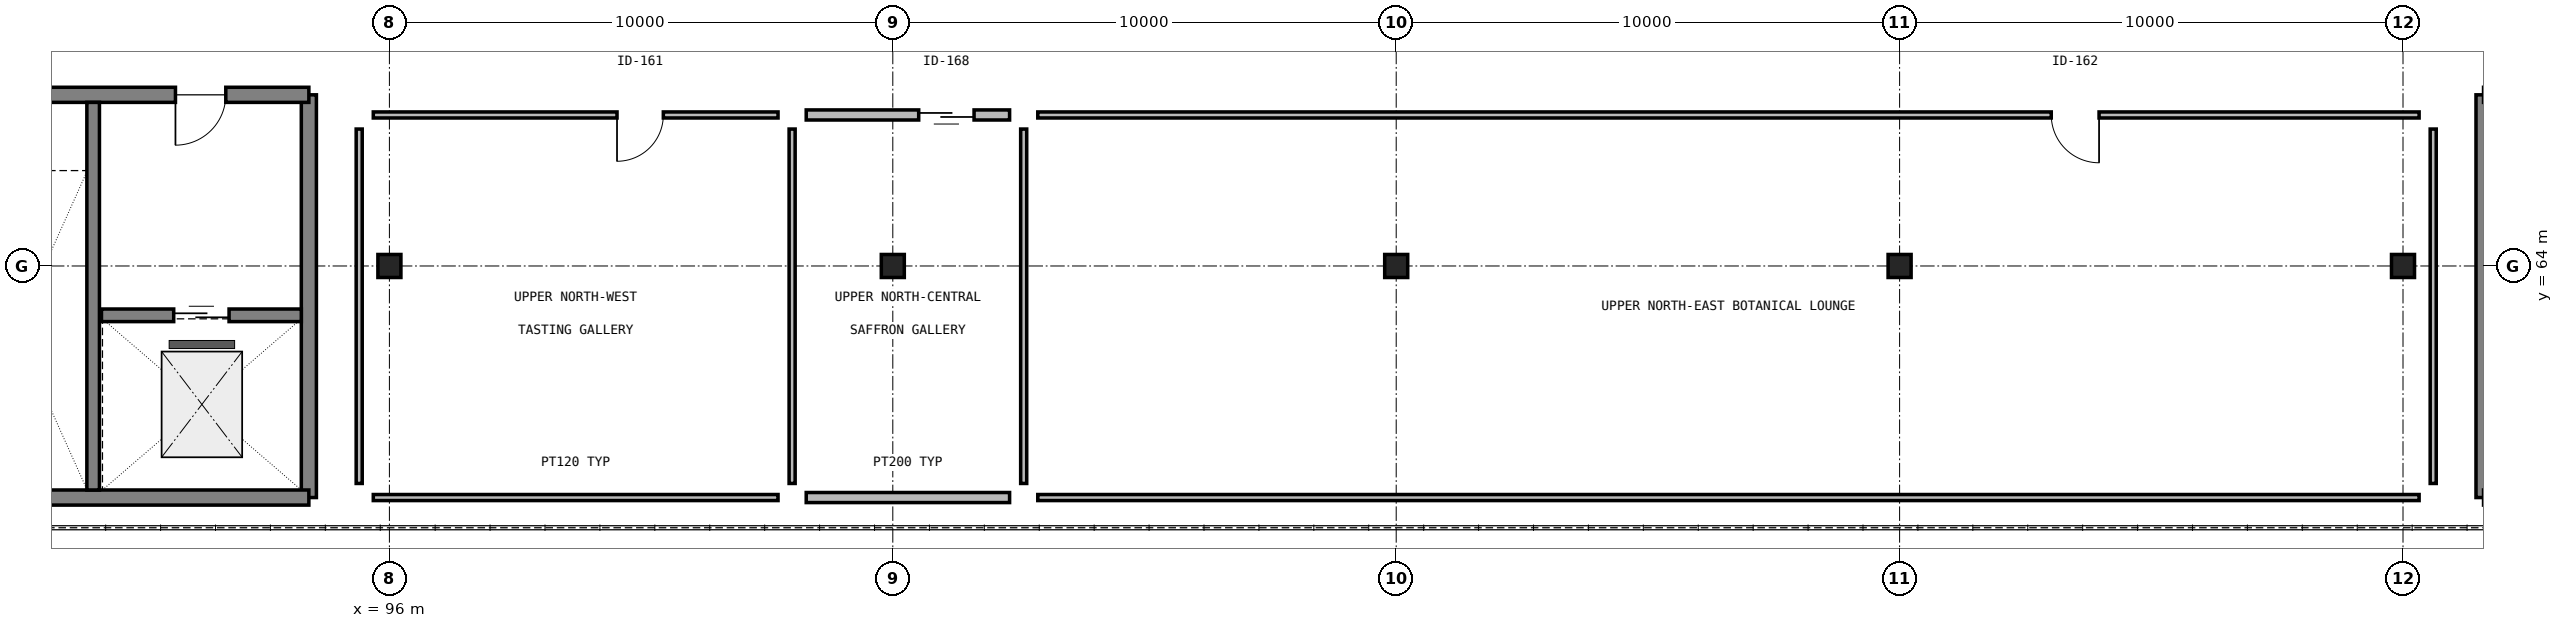
"""IFC4 building model, lengths in metres.
Left out: names, types, materials, properties, quantities, classifications, styles, units other than length and angle.
Written with IfcOpenShell. Run it as: python <this file> out.ifc"""

import sys

from ifc_helpers import new_model, si_unit, direction, frame, frame_2d, origin, origin_2d_with_axis, place, context, subcontext, project, spatial, rectangle, hollow_circle, extrude, element, fill, save


model = new_model("IFC4")
c1 = context("Model", 3, precision=1e-05, world=origin(), true_north=direction((0.0, 1.0)))
c2 = subcontext(c1, "Body", "Model", "MODEL_VIEW")
j1 = project(units=[si_unit("LENGTHUNIT", "METRE"), si_unit("PLANEANGLEUNIT", "RADIAN")], contexts=[c1])
p1 = place(None, origin())
s1 = spatial("IfcSite", under=j1, at=p1, CompositionType="ELEMENT")
p2 = place(p1, origin())
s2 = spatial("IfcBuilding", under=s1, at=p2, CompositionType="ELEMENT")
p3 = place(p2, frame((0.0, 0.0, 8.4)))
s3 = spatial("IfcBuildingStorey", under=s2, at=p3, CompositionType="ELEMENT", Elevation=8.4)
for number, where, z_axis, x_axis in (
    (1, (96.0, 64.0, 0.0), (0.0, 0.0, 1.0), (1.0, 0.0, 0.0)),
    (2, (106.0, 64.0, 0.0), (0.0, 0.0, 1.0), (1.0, 0.0, 0.0)),
    (3, (116.0, 64.0, 0.0), (0.0, 0.0, 1.0), (1.0, 0.0, 0.0)),
    (4, (126.0, 64.0, 0.0), (0.0, 0.0, 1.0), (1.0, 0.0, 0.0)),
    (5, (136.0, 64.0, 0.0), (0.0, 0.0, 1.0), (1.0, 0.0, 0.0)),
):
    element("IfcColumn", number, at=place(p3, frame(where, z_axis=z_axis, x_axis=x_axis)), inside=s3, PredefinedType="COLUMN", context=c2, shape_type="SweptSolid", body=[
        extrude(hollow_circle(Radius=0.229, WallThickness=0.013, at=origin_2d_with_axis()), origin(), (0.0, 0.0, 1.0), 6.0),
    ])
p4 = place(p3, frame((94.4, 59.4, 0.0), z_axis=(0.0, 0.0, 1.0), x_axis=(0.0, 1.0, 0.0)))
e6 = element("IfcWall", 6, at=p4, inside=s3, PredefinedType="SHEAR", context=c2, shape_type="SweptSolid", body=[
    extrude(rectangle(XDim=8.0, YDim=0.3, at=frame_2d((4.0, 0.0), x_axis=(1.0, 0.0))), origin(), (0.0, 0.0, 1.0), 3.36),
])
p5 = place(p3, frame((87.0, 59.4, 0.0), z_axis=(0.0, 0.0, 1.0), x_axis=(1.0, 0.0, 0.0)))
e7 = element("IfcWall", 7, at=p5, inside=s3, PredefinedType="SHEAR", context=c2, shape_type="SweptSolid", body=[
    extrude(rectangle(XDim=7.4, YDim=0.3, at=frame_2d((3.7, 0.0), x_axis=(1.0, 0.0))), origin(), (0.0, 0.0, 1.0), 3.36),
])
p6 = place(p3, frame((94.4, 67.4, 0.0), z_axis=(0.0, 0.0, 1.0), x_axis=(-1.0, 0.0, 0.0)))
e8 = element("IfcWall", 8, at=p6, inside=s3, PredefinedType="SHEAR", context=c2, shape_type="SweptSolid", body=[
    extrude(rectangle(XDim=7.4, YDim=0.3, at=frame_2d((3.7, 0.0), x_axis=(1.0, 0.0))), origin(), (0.0, 0.0, 1.0), 3.36),
])
p7 = place(p6, frame((1.65, 0.0, 0.0)))
e9 = element("IfcOpeningElement", 9, at=p7, cuts=e8, PredefinedType="OPENING", context=c2, shape_type="SweptSolid", body=[
    extrude(rectangle(XDim=1.0, YDim=2.15, at=frame_2d((0.5, 1.075), x_axis=(1.0, 0.0))), frame((0.0, 0.16, 0.0), z_axis=(0.0, -1.0, 0.0), x_axis=(1.0, 0.0, 0.0)), (0.0, 0.0, 1.0), 0.32),
])
p8 = place(p6, frame((5.3, 0.0, 0.0)))
e10 = element("IfcOpeningElement", 10, at=p8, cuts=e8, PredefinedType="OPENING", context=c2, shape_type="SweptSolid", body=[
    extrude(rectangle(XDim=1.0, YDim=2.15, at=frame_2d((0.5, 1.075), x_axis=(1.0, 0.0))), frame((0.0, 0.16, 0.0), z_axis=(0.0, -1.0, 0.0), x_axis=(1.0, 0.0, 0.0)), (0.0, 0.0, 1.0), 0.32),
])
p9 = place(p3, frame((90.115, 59.55, 0.0), z_axis=(0.0, 0.0, 1.0), x_axis=(0.0, 1.0, 0.0)))
e11 = element("IfcWall", 11, at=p9, inside=s3, PredefinedType="SHEAR", context=c2, shape_type="SweptSolid", body=[
    extrude(rectangle(XDim=7.7, YDim=0.25, at=frame_2d((3.85, 0.0), x_axis=(1.0, 0.0))), origin(), (0.0, 0.0, 1.0), 3.36),
])
p10 = place(p3, frame((90.28, 63.02, 0.0), z_axis=(0.0, 0.0, 1.0), x_axis=(1.0, 0.0, 0.0)))
e12 = element("IfcWall", 12, at=p10, inside=s3, PredefinedType="SHEAR", context=c2, shape_type="SweptSolid", body=[
    extrude(rectangle(XDim=3.97, YDim=0.25, at=frame_2d((1.985, 0.0), x_axis=(1.0, 0.0))), origin(), (0.0, 0.0, 1.0), 3.36),
])
p11 = place(p10, frame((1.435, 0.0, 0.0)))
e13 = element("IfcOpeningElement", 13, at=p11, cuts=e12, PredefinedType="OPENING", context=c2, shape_type="SweptSolid", body=[
    extrude(rectangle(XDim=1.1, YDim=2.15, at=frame_2d((0.55, 1.075), x_axis=(1.0, 0.0))), frame((0.0, 0.135, 0.0), z_axis=(0.0, -1.0, 0.0), x_axis=(1.0, 0.0, 0.0)), (0.0, 0.0, 1.0), 0.27),
])
p12 = place(p3, frame((137.6, 67.4, 0.0), z_axis=(0.0, 0.0, 1.0), x_axis=(0.0, -1.0, 0.0)))
e14 = element("IfcWall", 14, at=p12, inside=s3, PredefinedType="SHEAR", context=c2, shape_type="SweptSolid", body=[
    extrude(rectangle(XDim=8.0, YDim=0.3, at=frame_2d((4.0, 0.0), x_axis=(1.0, 0.0))), origin(), (0.0, 0.0, 1.0), 3.36),
])
p13 = place(p3, frame((95.68, 59.4, 0.0), z_axis=(0.0, 0.0, 1.0), x_axis=(1.0, 0.0, 0.0)))
e15 = element("IfcWall", 15, at=p13, inside=s3, PredefinedType="PARTITIONING", context=c2, shape_type="SweptSolid", body=[
    extrude(rectangle(XDim=8.04, YDim=0.12, at=frame_2d((4.02, 0.0), x_axis=(1.0, 0.0))), origin(), (0.0, 0.0, 1.0), 2.74),
])
p14 = place(p3, frame((104.0, 59.68, 0.0), z_axis=(0.0, 0.0, 1.0), x_axis=(0.0, 1.0, 0.0)))
e16 = element("IfcWall", 16, at=p14, inside=s3, PredefinedType="PARTITIONING", context=c2, shape_type="SweptSolid", body=[
    extrude(rectangle(XDim=7.04, YDim=0.12, at=frame_2d((3.52, 0.0), x_axis=(1.0, 0.0))), origin(), (0.0, 0.0, 1.0), 2.74),
])
p15 = place(p3, frame((103.72, 67.0, 0.0), z_axis=(0.0, 0.0, 1.0), x_axis=(-1.0, 0.0, 0.0)))
e17 = element("IfcWall", 17, at=p15, inside=s3, PredefinedType="PARTITIONING", context=c2, shape_type="SweptSolid", body=[
    extrude(rectangle(XDim=8.04, YDim=0.12, at=frame_2d((4.02, 0.0), x_axis=(1.0, 0.0))), origin(), (0.0, 0.0, 1.0), 2.74),
])
p16 = place(p15, frame((2.278, 0.0, 0.0)))
e18 = element("IfcOpeningElement", 18, at=p16, cuts=e17, PredefinedType="OPENING", context=c2, shape_type="SweptSolid", body=[
    extrude(rectangle(XDim=0.92, YDim=2.15, at=frame_2d((0.46, 1.075), x_axis=(1.0, 0.0))), frame((0.0, 0.07, 0.0), z_axis=(0.0, -1.0, 0.0), x_axis=(1.0, 0.0, 0.0)), (0.0, 0.0, 1.0), 0.14),
])
p17 = place(p3, frame((95.4, 66.72, 0.0), z_axis=(0.0, 0.0, 1.0), x_axis=(0.0, -1.0, 0.0)))
e19 = element("IfcWall", 19, at=p17, inside=s3, PredefinedType="PARTITIONING", context=c2, shape_type="SweptSolid", body=[
    extrude(rectangle(XDim=7.04, YDim=0.12, at=frame_2d((3.52, 0.0), x_axis=(1.0, 0.0))), origin(), (0.0, 0.0, 1.0), 2.74),
])
p18 = place(p3, frame((108.88, 59.4, 0.0), z_axis=(0.0, 0.0, 1.0), x_axis=(1.0, 0.0, 0.0)))
e20 = element("IfcWall", 20, at=p18, inside=s3, PredefinedType="PARTITIONING", context=c2, shape_type="SweptSolid", body=[
    extrude(rectangle(XDim=27.44, YDim=0.12, at=frame_2d((13.72, 0.0), x_axis=(1.0, 0.0))), origin(), (0.0, 0.0, 1.0), 2.74),
])
p19 = place(p3, frame((136.6, 59.68, 0.0), z_axis=(0.0, 0.0, 1.0), x_axis=(0.0, 1.0, 0.0)))
e21 = element("IfcWall", 21, at=p19, inside=s3, PredefinedType="PARTITIONING", context=c2, shape_type="SweptSolid", body=[
    extrude(rectangle(XDim=7.04, YDim=0.12, at=frame_2d((3.52, 0.0), x_axis=(1.0, 0.0))), origin(), (0.0, 0.0, 1.0), 2.74),
])
p20 = place(p3, frame((136.32, 67.0, 0.0), z_axis=(0.0, 0.0, 1.0), x_axis=(-1.0, 0.0, 0.0)))
e22 = element("IfcWall", 22, at=p20, inside=s3, PredefinedType="PARTITIONING", context=c2, shape_type="SweptSolid", body=[
    extrude(rectangle(XDim=27.44, YDim=0.12, at=frame_2d((13.72, 0.0), x_axis=(1.0, 0.0))), origin(), (0.0, 0.0, 1.0), 2.74),
])
p21 = place(p20, frame((6.358, 0.0, 0.0)))
e23 = element("IfcOpeningElement", 23, at=p21, cuts=e22, PredefinedType="OPENING", context=c2, shape_type="SweptSolid", body=[
    extrude(rectangle(XDim=0.95, YDim=2.15, at=frame_2d((0.475, 1.075), x_axis=(1.0, 0.0))), frame((0.0, 0.07, 0.0), z_axis=(0.0, -1.0, 0.0), x_axis=(1.0, 0.0, 0.0)), (0.0, 0.0, 1.0), 0.14),
])
p22 = place(p3, frame((108.6, 66.72, 0.0), z_axis=(0.0, 0.0, 1.0), x_axis=(0.0, -1.0, 0.0)))
e24 = element("IfcWall", 24, at=p22, inside=s3, PredefinedType="PARTITIONING", context=c2, shape_type="SweptSolid", body=[
    extrude(rectangle(XDim=7.04, YDim=0.12, at=frame_2d((3.52, 0.0), x_axis=(1.0, 0.0))), origin(), (0.0, 0.0, 1.0), 2.74),
])
p23 = place(p3, frame((104.28, 59.4, 0.0), z_axis=(0.0, 0.0, 1.0), x_axis=(1.0, 0.0, 0.0)))
e25 = element("IfcWall", 25, at=p23, inside=s3, PredefinedType="MOVABLE", context=c2, shape_type="SweptSolid", body=[
    extrude(rectangle(XDim=4.04, YDim=0.2, at=frame_2d((2.02, 0.0), x_axis=(1.0, 0.0))), origin(), (0.0, 0.0, 1.0), 2.74),
])
p24 = place(p3, frame((108.32, 67.0, 0.0), z_axis=(0.0, 0.0, 1.0), x_axis=(-1.0, 0.0, 0.0)))
e26 = element("IfcWall", 26, at=p24, inside=s3, PredefinedType="MOVABLE", context=c2, shape_type="SweptSolid", body=[
    extrude(rectangle(XDim=4.04, YDim=0.2, at=frame_2d((2.02, 0.0), x_axis=(1.0, 0.0))), origin(), (0.0, 0.0, 1.0), 2.74),
])
p25 = place(p24, frame((0.706, 0.0, 0.0)))
e27 = element("IfcOpeningElement", 27, at=p25, cuts=e26, PredefinedType="OPENING", context=c2, shape_type="SweptSolid", body=[
    extrude(rectangle(XDim=1.1, YDim=2.15, at=frame_2d((0.55, 1.075), x_axis=(1.0, 0.0))), frame((0.0, 0.11, 0.0), z_axis=(0.0, -1.0, 0.0), x_axis=(1.0, 0.0, 0.0)), (0.0, 0.0, 1.0), 0.22),
])
p26 = place(p7, origin())
e28 = element("IfcDoor", 28, at=p26, inside=s3, OperationType="SINGLE_SWING_RIGHT", PredefinedType="DOOR", context=c2, shape_type="SweptSolid", body=[
    extrude(rectangle(XDim=1.0, YDim=2.15, at=frame_2d((0.5, 1.075), x_axis=(1.0, 0.0))), frame((0.0, 0.025, 0.0), z_axis=(0.0, -1.0, 0.0), x_axis=(1.0, 0.0, 0.0)), (0.0, 0.0, 1.0), 0.05),
])
fill(e9, e28)
p27 = place(p11, origin())
e29 = element("IfcDoor", 29, at=p27, inside=s3, OperationType="SLIDING_TO_LEFT", PredefinedType="DOOR", context=c2, shape_type="SweptSolid", body=[
    extrude(rectangle(XDim=1.1, YDim=2.15, at=frame_2d((0.55, 1.075), x_axis=(1.0, 0.0))), frame((0.0, 0.025, 0.0), z_axis=(0.0, -1.0, 0.0), x_axis=(1.0, 0.0, 0.0)), (0.0, 0.0, 1.0), 0.05),
])
fill(e13, e29)
p28 = place(p16, origin())
e30 = element("IfcDoor", 30, at=p28, inside=s3, OperationType="SINGLE_SWING_RIGHT", PredefinedType="DOOR", context=c2, shape_type="SweptSolid", body=[
    extrude(rectangle(XDim=0.92, YDim=2.15, at=frame_2d((0.46, 1.075), x_axis=(1.0, 0.0))), frame((0.0, 0.025, 0.0), z_axis=(0.0, -1.0, 0.0), x_axis=(1.0, 0.0, 0.0)), (0.0, 0.0, 1.0), 0.05),
])
fill(e18, e30)
p29 = place(p21, origin())
e31 = element("IfcDoor", 31, at=p29, inside=s3, OperationType="SINGLE_SWING_LEFT", PredefinedType="DOOR", context=c2, shape_type="SweptSolid", body=[
    extrude(rectangle(XDim=0.95, YDim=2.15, at=frame_2d((0.475, 1.075), x_axis=(1.0, 0.0))), frame((0.0, 0.025, 0.0), z_axis=(0.0, -1.0, 0.0), x_axis=(1.0, 0.0, 0.0)), (0.0, 0.0, 1.0), 0.05),
])
fill(e23, e31)
p30 = place(p25, origin())
e32 = element("IfcDoor", 32, at=p30, inside=s3, OperationType="SLIDING_TO_LEFT", PredefinedType="DOOR", context=c2, shape_type="SweptSolid", body=[
    extrude(rectangle(XDim=1.1, YDim=2.15, at=frame_2d((0.55, 1.075), x_axis=(1.0, 0.0))), frame((0.0, 0.025, 0.0), z_axis=(0.0, -1.0, 0.0), x_axis=(1.0, 0.0, 0.0)), (0.0, 0.0, 1.0), 0.05),
])
fill(e27, e32)
save(model, sys.argv[1])
